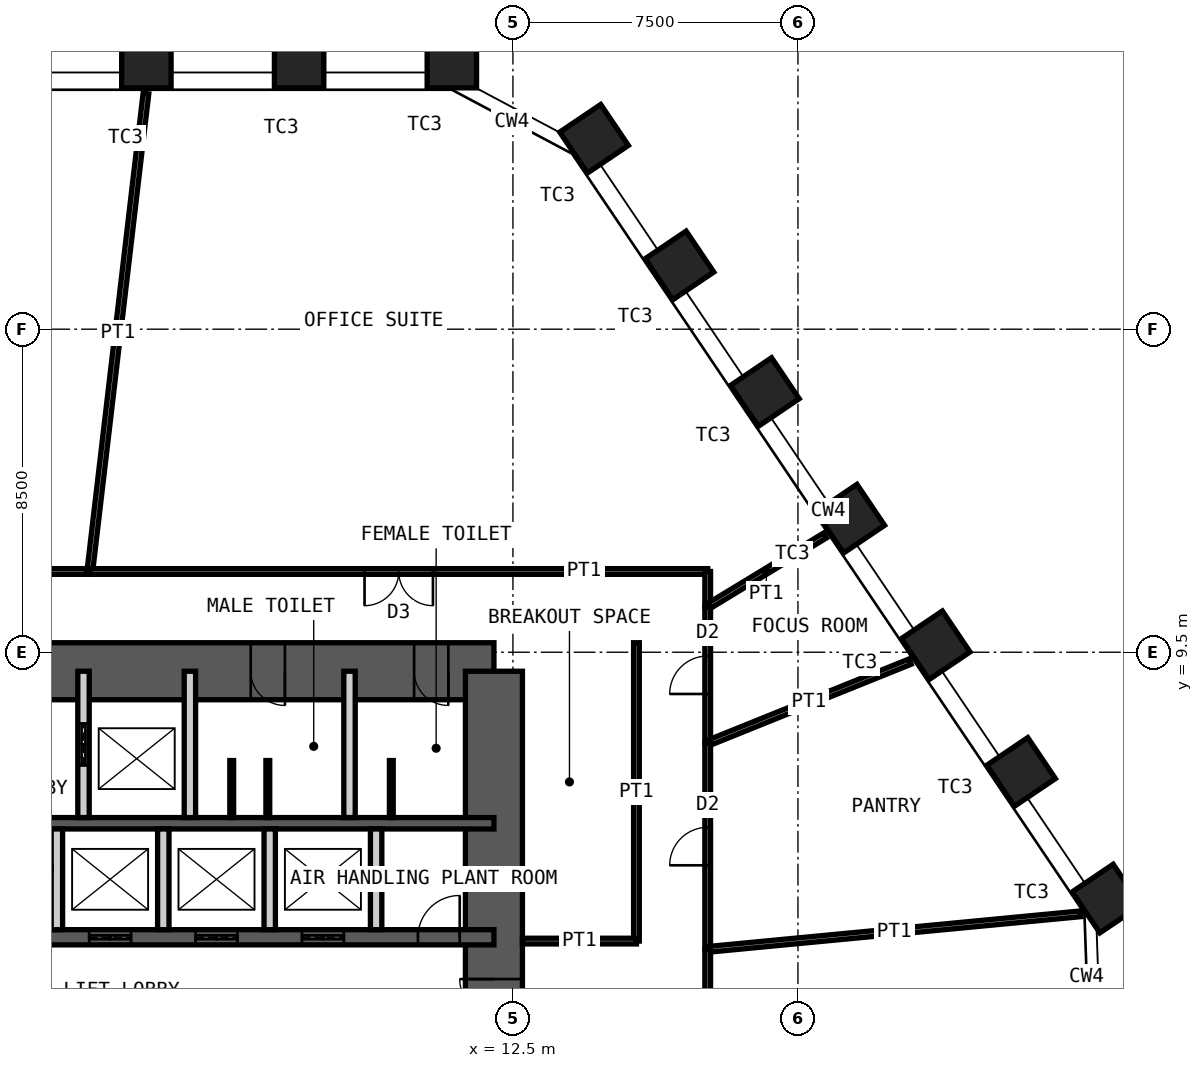
"""IFC4 building model, lengths in metres.
Left out: names, types, materials, properties, quantities, classifications, styles, units other than length and angle.
Written with IfcOpenShell. Run it as: python <this file> out.ifc"""

import sys

from ifc_helpers import new_model, si_unit, direction, frame, frame_2d, origin, origin_2d, place, context, subcontext, project, spatial, rectangle, hollow_rectangle, extrude, element, fill, save


model = new_model("IFC4")
c1 = context("Model", 3, precision=1e-05, world=origin(), true_north=direction((0.0, 1.0)))
c2 = subcontext(c1, "Body", "Model", "MODEL_VIEW")
j1 = project(units=[si_unit("LENGTHUNIT", "METRE"), si_unit("PLANEANGLEUNIT", "RADIAN")], contexts=[c1])
p1 = place(None, origin())
s1 = spatial("IfcSite", under=j1, at=p1, CompositionType="ELEMENT")
p2 = place(p1, origin())
s2 = spatial("IfcBuilding", under=s1, at=p2, CompositionType="ELEMENT")
p3 = place(p2, frame((0.0, 0.0, 124.0)))
s3 = spatial("IfcBuildingStorey", under=s2, at=p3, CompositionType="ELEMENT", Elevation=124.0)
for number, where, z_axis, x_axis in (
    (1, (2.854, 25.0, 0.0), (0.0, 0.0, 1.0), (-1.0, 0.0, 0.0)),
    (2, (6.874, 25.0, 0.0), (0.0, 0.0, 1.0), (-1.0, 0.0, 0.0)),
    (3, (10.893, 25.0, 0.0), (0.0, 0.0, 1.0), (-1.0, 0.0, 0.0)),
    (4, (14.635, 23.01, 0.0), (0.0, 0.0, 1.0), (-0.559, 0.829, 0.0)),
    (5, (16.882, 19.678, 0.0), (0.0, 0.0, 1.0), (-0.559, 0.829, 0.0)),
    (6, (19.13, 16.346, 0.0), (0.0, 0.0, 1.0), (-0.559, 0.829, 0.0)),
    (7, (21.377, 13.014, 0.0), (0.0, 0.0, 1.0), (-0.559, 0.829, 0.0)),
    (8, (23.625, 9.682, 0.0), (0.0, 0.0, 1.0), (-0.559, 0.829, 0.0)),
    (9, (25.872, 6.351, 0.0), (0.0, 0.0, 1.0), (-0.559, 0.829, 0.0)),
    (10, (28.119, 3.019, 0.0), (0.0, 0.0, 1.0), (-0.559, 0.829, 0.0)),
):
    element("IfcColumn", number, at=place(p3, frame(where, z_axis=z_axis, x_axis=x_axis)), inside=s3, PredefinedType="COLUMN", context=c2, shape_type="SweptSolid", body=[
        extrude(hollow_rectangle(XDim=1.3, YDim=1.3, WallThickness=0.1, at=origin_2d()), origin(), (0.0, 0.0, 1.0), 4.2),
    ])
p4 = place(p3, frame((-12.0, 9.0, 0.0), z_axis=(0.0, 0.0, 1.0), x_axis=(1.0, 0.0, 0.0)))
e11 = element("IfcWall", 11, at=p4, inside=s3, PredefinedType="SHEAR", context=c2, shape_type="SweptSolid", body=[
    extrude(rectangle(XDim=24.0, YDim=1.5, at=frame_2d((12.0, 0.0))), origin(), (0.0, 0.0, 1.0), 4.2),
])
p5 = place(p4, frame((10.4, 0.0, 0.0)))
e12 = element("IfcOpeningElement", 12, at=p5, cuts=e11, PredefinedType="OPENING", context=c2, shape_type="SweptSolid", body=[
    extrude(rectangle(XDim=1.0, YDim=2.1, at=frame_2d((0.5, 1.05))), frame((0.0, 0.76, 0.0), z_axis=(0.0, -1.0, 0.0), x_axis=(1.0, 0.0, 0.0)), (0.0, 0.0, 1.0), 1.52),
])
p6 = place(p4, frame((17.6, 0.0, 0.0)))
e13 = element("IfcOpeningElement", 13, at=p6, cuts=e11, PredefinedType="OPENING", context=c2, shape_type="SweptSolid", body=[
    extrude(rectangle(XDim=0.9, YDim=2.1, at=frame_2d((0.45, 1.05))), frame((0.0, 0.76, 0.0), z_axis=(0.0, -1.0, 0.0), x_axis=(1.0, 0.0, 0.0)), (0.0, 0.0, 1.0), 1.52),
])
p7 = place(p4, frame((21.9, 0.0, 0.0)))
e14 = element("IfcOpeningElement", 14, at=p7, cuts=e11, PredefinedType="OPENING", context=c2, shape_type="SweptSolid", body=[
    extrude(rectangle(XDim=0.9, YDim=2.1, at=frame_2d((0.45, 1.05))), frame((0.0, 0.76, 0.0), z_axis=(0.0, -1.0, 0.0), x_axis=(1.0, 0.0, 0.0)), (0.0, 0.0, 1.0), 1.52),
])
p8 = place(p3, frame((12.0, -9.0, 0.0), z_axis=(0.0, 0.0, 1.0), x_axis=(0.0, 1.0, 0.0)))
e15 = element("IfcWall", 15, at=p8, inside=s3, PredefinedType="SHEAR", context=c2, shape_type="SweptSolid", body=[
    extrude(rectangle(XDim=18.0, YDim=1.5, at=frame_2d((9.0, 0.0))), origin(), (0.0, 0.0, 1.0), 4.2),
])
p9 = place(p8, frame((8.1, 0.0, 0.0)))
e16 = element("IfcOpeningElement", 16, at=p9, cuts=e15, PredefinedType="OPENING", context=c2, shape_type="SweptSolid", body=[
    extrude(rectangle(XDim=1.8, YDim=2.1, at=frame_2d((0.9, 1.05))), frame((0.0, 0.76, 0.0), z_axis=(0.0, -1.0, 0.0), x_axis=(1.0, 0.0, 0.0)), (0.0, 0.0, 1.0), 1.52),
])
p10 = place(p3, frame((-12.0, 5.0, 0.0), z_axis=(0.0, 0.0, 1.0), x_axis=(1.0, 0.0, 0.0)))
e17 = element("IfcWall", 17, at=p10, inside=s3, PredefinedType="SHEAR", context=c2, shape_type="SweptSolid", body=[
    extrude(rectangle(XDim=24.0, YDim=0.3, at=frame_2d((12.0, 0.0))), origin(), (0.0, 0.0, 1.0), 4.2),
])
p11 = place(p3, frame((-12.0, 2.0, 0.0), z_axis=(0.0, 0.0, 1.0), x_axis=(1.0, 0.0, 0.0)))
e18 = element("IfcWall", 18, at=p11, inside=s3, PredefinedType="SHEAR", context=c2, shape_type="SweptSolid", body=[
    extrude(rectangle(XDim=24.0, YDim=0.4, at=frame_2d((12.0, 0.0))), origin(), (0.0, 0.0, 1.0), 4.2),
])
p12 = place(p11, frame((2.4, 0.0, 0.0)))
e19 = element("IfcOpeningElement", 19, at=p12, cuts=e18, PredefinedType="OPENING", context=c2, shape_type="SweptSolid", body=[
    extrude(rectangle(XDim=1.1, YDim=2.1, at=frame_2d((0.55, 1.05))), frame((0.0, 0.21, 0.0), z_axis=(0.0, -1.0, 0.0), x_axis=(1.0, 0.0, 0.0)), (0.0, 0.0, 1.0), 0.42),
])
p13 = place(p11, frame((22.0, 0.0, 0.0)))
e20 = element("IfcOpeningElement", 20, at=p13, cuts=e18, PredefinedType="OPENING", context=c2, shape_type="SweptSolid", body=[
    extrude(rectangle(XDim=1.1, YDim=2.1, at=frame_2d((0.55, 1.05))), frame((0.0, 0.21, 0.0), z_axis=(0.0, -1.0, 0.0), x_axis=(1.0, 0.0, 0.0)), (0.0, 0.0, 1.0), 0.42),
])
p14 = place(p11, frame((10.15, 0.0, 0.0)))
e21 = element("IfcOpeningElement", 21, at=p14, cuts=e18, PredefinedType="OPENING", context=c2, shape_type="SweptSolid", body=[
    extrude(rectangle(XDim=1.0, YDim=2.1, at=frame_2d((0.5, 1.05))), frame((0.0, 0.21, 0.0), z_axis=(0.0, -1.0, 0.0), x_axis=(1.0, 0.0, 0.0)), (0.0, 0.0, 1.0), 0.42),
])
p15 = place(p11, frame((6.9, 0.0, 0.0)))
e22 = element("IfcOpeningElement", 22, at=p15, cuts=e18, PredefinedType="OPENING", context=c2, shape_type="SweptSolid", body=[
    extrude(rectangle(XDim=1.0, YDim=2.1, at=frame_2d((0.5, 1.05))), frame((0.0, 0.21, 0.0), z_axis=(0.0, -1.0, 0.0), x_axis=(1.0, 0.0, 0.0)), (0.0, 0.0, 1.0), 0.42),
])
p16 = place(p11, frame((13.35, 0.0, 0.0)))
e23 = element("IfcOpeningElement", 23, at=p16, cuts=e18, PredefinedType="OPENING", context=c2, shape_type="SweptSolid", body=[
    extrude(rectangle(XDim=1.1, YDim=2.4, at=frame_2d((0.55, 1.2))), frame((0.0, 0.21, 0.0), z_axis=(0.0, -1.0, 0.0), x_axis=(1.0, 0.0, 0.0)), (0.0, 0.0, 1.0), 0.42),
])
p17 = place(p11, frame((16.15, 0.0, 0.0)))
e24 = element("IfcOpeningElement", 24, at=p17, cuts=e18, PredefinedType="OPENING", context=c2, shape_type="SweptSolid", body=[
    extrude(rectangle(XDim=1.1, YDim=2.4, at=frame_2d((0.55, 1.2))), frame((0.0, 0.21, 0.0), z_axis=(0.0, -1.0, 0.0), x_axis=(1.0, 0.0, 0.0)), (0.0, 0.0, 1.0), 0.42),
])
p18 = place(p11, frame((18.95, 0.0, 0.0)))
e25 = element("IfcOpeningElement", 25, at=p18, cuts=e18, PredefinedType="OPENING", context=c2, shape_type="SweptSolid", body=[
    extrude(rectangle(XDim=1.1, YDim=2.4, at=frame_2d((0.55, 1.2))), frame((0.0, 0.21, 0.0), z_axis=(0.0, -1.0, 0.0), x_axis=(1.0, 0.0, 0.0)), (0.0, 0.0, 1.0), 0.42),
])
p19 = place(p3, frame((1.2, 5.15, 0.0), z_axis=(0.0, 0.0, 1.0), x_axis=(0.0, 1.0, 0.0)))
e26 = element("IfcWall", 26, at=p19, inside=s3, PredefinedType="PARTITIONING", context=c2, shape_type="SweptSolid", body=[
    extrude(rectangle(XDim=3.85, YDim=0.3, at=frame_2d((1.925, 0.0))), origin(), (0.0, 0.0, 1.0), 3.98),
])
p20 = place(p19, frame((1.375, 0.0, 0.0)))
e27 = element("IfcOpeningElement", 27, at=p20, cuts=e26, PredefinedType="OPENING", context=c2, shape_type="SweptSolid", body=[
    extrude(rectangle(XDim=1.1, YDim=2.4, at=frame_2d((0.55, 1.2))), frame((0.0, 0.16, 0.0), z_axis=(0.0, -1.0, 0.0), x_axis=(1.0, 0.0, 0.0)), (0.0, 0.0, 1.0), 0.32),
])
for number, where, z_axis, x_axis in (
    (28, (4.0, 5.15, 0.0), (0.0, 0.0, 1.0), (0.0, 1.0, 0.0)),
    (29, (8.2, 5.15, 0.0), (0.0, 0.0, 1.0), (0.0, 1.0, 0.0)),
):
    element("IfcWall", number, at=place(p3, frame(where, z_axis=z_axis, x_axis=x_axis)), inside=s3, PredefinedType="PARTITIONING", context=c2, shape_type="SweptSolid", body=[
        extrude(rectangle(XDim=3.85, YDim=0.3, at=frame_2d((1.925, 0.0))), origin(), (0.0, 0.0, 1.0), 3.98),
    ])
for number, where, z_axis, x_axis in (
    (30, (0.5, 2.2, 0.0), (0.0, 0.0, 1.0), (0.0, 1.0, 0.0)),
    (31, (3.3, 2.2, 0.0), (0.0, 0.0, 1.0), (0.0, 1.0, 0.0)),
    (32, (6.1, 2.2, 0.0), (0.0, 0.0, 1.0), (0.0, 1.0, 0.0)),
    (33, (8.9, 2.2, 0.0), (0.0, 0.0, 1.0), (0.0, 1.0, 0.0)),
):
    element("IfcWall", number, at=place(p3, frame(where, z_axis=z_axis, x_axis=x_axis)), inside=s3, PredefinedType="PARTITIONING", context=c2, shape_type="SweptSolid", body=[
        extrude(rectangle(XDim=2.65, YDim=0.3, at=frame_2d((1.325, 0.0))), origin(), (0.0, 0.0, 1.0), 3.98),
    ])
for number, where, z_axis, x_axis in (
    (34, (5.1, 5.15, 0.0), (0.0, 0.0, 1.0), (0.0, 1.0, 0.0)),
    (35, (6.05, 5.15, 0.0), (0.0, 0.0, 1.0), (0.0, 1.0, 0.0)),
    (36, (9.3, 5.15, 0.0), (0.0, 0.0, 1.0), (0.0, 1.0, 0.0)),
):
    element("IfcWall", number, at=place(p3, frame(where, z_axis=z_axis, x_axis=x_axis)), inside=s3, PredefinedType="PARTITIONING", context=c2, shape_type="SweptSolid", body=[
        extrude(rectangle(XDim=1.5, YDim=0.1, at=frame_2d((0.75, 0.0))), origin(), (0.0, 0.0, 1.0), 2.1),
    ])
p21 = place(p3, frame((-8.277, 11.625, 0.0), z_axis=(0.0, 0.0, 1.0), x_axis=(1.0, 0.0, 0.0)))
e37 = element("IfcWall", 37, at=p21, inside=s3, PredefinedType="PARTITIONING", context=c2, shape_type="SweptSolid", body=[
    extrude(rectangle(XDim=9.642, YDim=0.15, at=frame_2d((4.821, 0.0))), origin(), (0.0, 0.0, 1.0), 4.03),
])
p22 = place(p21, frame((3.921, 0.0, 0.0)))
e38 = element("IfcOpeningElement", 38, at=p22, cuts=e37, PredefinedType="OPENING", context=c2, shape_type="SweptSolid", body=[
    extrude(rectangle(XDim=1.8, YDim=2.4, at=frame_2d((0.9, 1.2))), frame((0.0, 0.085, 0.0), z_axis=(0.0, -1.0, 0.0), x_axis=(1.0, 0.0, 0.0)), (0.0, 0.0, 1.0), 0.17),
])
p23 = place(p3, frame((2.843, 24.201, 0.0), z_axis=(0.0, 0.0, 1.0), x_axis=(-0.116670084723, -0.993170726175, 0.0)))
e39 = element("IfcWall", 39, at=p23, inside=s3, PredefinedType="PARTITIONING", context=c2, shape_type="SweptSolid", body=[
    extrude(rectangle(XDim=12.662, YDim=0.15, at=frame_2d((6.331, 0.0))), origin(), (0.0, 0.0, 1.0), 3.33),
])
p24 = place(p3, frame((1.366, 11.625, 0.0), z_axis=(0.0, 0.0, 1.0), x_axis=(1.0, 0.0, 0.0)))
e40 = element("IfcWall", 40, at=p24, inside=s3, PredefinedType="PARTITIONING", context=c2, shape_type="SweptSolid", body=[
    extrude(rectangle(XDim=16.259, YDim=0.15, at=frame_2d((8.13, 0.0))), origin(), (0.0, 0.0, 1.0), 4.03),
])
p25 = place(p24, frame((7.23, 0.0, 0.0)))
e41 = element("IfcOpeningElement", 41, at=p25, cuts=e40, PredefinedType="OPENING", context=c2, shape_type="SweptSolid", body=[
    extrude(rectangle(XDim=1.8, YDim=2.4, at=frame_2d((0.9, 1.2))), frame((0.0, 0.085, 0.0), z_axis=(0.0, -1.0, 0.0), x_axis=(1.0, 0.0, 0.0)), (0.0, 0.0, 1.0), 0.17),
])
p26 = place(p3, frame((17.625, 11.625, 0.0), z_axis=(0.0, 0.0, 1.0), x_axis=(0.0, -1.0, 0.0)))
e42 = element("IfcWall", 42, at=p26, inside=s3, PredefinedType="PARTITIONING", context=c2, shape_type="SweptSolid", body=[
    extrude(rectangle(XDim=0.927, YDim=0.15, at=frame_2d((0.464, 0.0))), origin(), (0.0, 0.0, 1.0), 4.03),
])
p27 = place(p3, frame((20.711, 12.571, 0.0), z_axis=(0.0, 0.0, 1.0), x_axis=(-0.854862500505, -0.518854608952, 0.0)))
e43 = element("IfcWall", 43, at=p27, inside=s3, PredefinedType="PARTITIONING", context=c2, shape_type="SweptSolid", body=[
    extrude(rectangle(XDim=3.61, YDim=0.15, at=frame_2d((1.805, 0.0))), origin(), (0.0, 0.0, 1.0), 3.33),
])
p28 = place(p3, frame((17.625, 10.698, 0.0), z_axis=(0.0, 0.0, 1.0), x_axis=(0.0, -1.0, 0.0)))
e44 = element("IfcWall", 44, at=p28, inside=s3, PredefinedType="PARTITIONING", context=c2, shape_type="SweptSolid", body=[
    extrude(rectangle(XDim=3.592, YDim=0.15, at=frame_2d((1.796, 0.0))), origin(), (0.0, 0.0, 1.0), 4.03),
])
p29 = place(p28, frame((1.296, 0.0, 0.0)))
e45 = element("IfcOpeningElement", 45, at=p29, cuts=e44, PredefinedType="OPENING", context=c2, shape_type="SweptSolid", body=[
    extrude(rectangle(XDim=1.0, YDim=2.4, at=frame_2d((0.5, 1.2))), frame((0.0, 0.085, 0.0), z_axis=(0.0, -1.0, 0.0), x_axis=(1.0, 0.0, 0.0)), (0.0, 0.0, 1.0), 0.17),
])
p30 = place(p3, frame((22.951, 9.254, 0.0), z_axis=(0.0, 0.0, 1.0), x_axis=(-0.927444087873, -0.373961848147, 0.0)))
e46 = element("IfcWall", 46, at=p30, inside=s3, PredefinedType="PARTITIONING", context=c2, shape_type="SweptSolid", body=[
    extrude(rectangle(XDim=5.743, YDim=0.15, at=frame_2d((2.872, 0.0))), origin(), (0.0, 0.0, 1.0), 3.33),
])
p31 = place(p3, frame((17.625, 7.106, 0.0), z_axis=(0.0, 0.0, 1.0), x_axis=(0.0, -1.0, 0.0)))
e47 = element("IfcWall", 47, at=p31, inside=s3, PredefinedType="PARTITIONING", context=c2, shape_type="SweptSolid", body=[
    extrude(rectangle(XDim=5.425, YDim=0.15, at=frame_2d((2.712, 0.0))), origin(), (0.0, 0.0, 1.0), 4.03),
])
p32 = place(p31, frame((2.212, 0.0, 0.0)))
e48 = element("IfcOpeningElement", 48, at=p32, cuts=e47, PredefinedType="OPENING", context=c2, shape_type="SweptSolid", body=[
    extrude(rectangle(XDim=1.0, YDim=2.4, at=frame_2d((0.5, 1.2))), frame((0.0, 0.085, 0.0), z_axis=(0.0, -1.0, 0.0), x_axis=(1.0, 0.0, 0.0)), (0.0, 0.0, 1.0), 0.17),
])
p33 = place(p3, frame((27.439, 2.618, 0.0), z_axis=(0.0, 0.0, 1.0), x_axis=(-0.995480435234, -0.094966852466, 0.0)))
e49 = element("IfcWall", 49, at=p33, inside=s3, PredefinedType="PARTITIONING", context=c2, shape_type="SweptSolid", body=[
    extrude(rectangle(XDim=9.859, YDim=0.15, at=frame_2d((4.93, 0.0))), origin(), (0.0, 0.0, 1.0), 2.93),
])
p34 = place(p3, frame((17.625, 1.681, 0.0), z_axis=(0.0, 0.0, 1.0), x_axis=(0.0, -1.0, 0.0)))
e50 = element("IfcWall", 50, at=p34, inside=s3, PredefinedType="PARTITIONING", context=c2, shape_type="SweptSolid", body=[
    extrude(rectangle(XDim=7.394, YDim=0.15, at=frame_2d((3.697, 0.0))), origin(), (0.0, 0.0, 1.0), 4.03),
])
p35 = place(p34, frame((3.197, 0.0, 0.0)))
e51 = element("IfcOpeningElement", 51, at=p35, cuts=e50, PredefinedType="OPENING", context=c2, shape_type="SweptSolid", body=[
    extrude(rectangle(XDim=1.0, YDim=2.4, at=frame_2d((0.5, 1.2))), frame((0.0, 0.085, 0.0), z_axis=(0.0, -1.0, 0.0), x_axis=(1.0, 0.0, 0.0)), (0.0, 0.0, 1.0), 0.17),
])
p36 = place(p3, frame((15.75, 1.9, 0.0), z_axis=(0.0, 0.0, 1.0), x_axis=(0.0, 1.0, 0.0)))
e52 = element("IfcWall", 52, at=p36, inside=s3, PredefinedType="PARTITIONING", context=c2, shape_type="SweptSolid", body=[
    extrude(rectangle(XDim=7.85, YDim=0.15, at=frame_2d((3.925, 0.0))), origin(), (0.0, 0.0, 1.0), 4.03),
])
p37 = place(p3, frame((12.75, 1.9, 0.0), z_axis=(0.0, 0.0, 1.0), x_axis=(1.0, 0.0, 0.0)))
e53 = element("IfcWall", 53, at=p37, inside=s3, PredefinedType="PARTITIONING", context=c2, shape_type="SweptSolid", body=[
    extrude(rectangle(XDim=3.0, YDim=0.15, at=frame_2d((1.5, 0.0))), origin(), (0.0, 0.0, 1.0), 2.93),
])
p38 = place(p6, origin())
e54 = element("IfcDoor", 54, at=p38, inside=s3, OperationType="SINGLE_SWING_RIGHT", PredefinedType="DOOR", context=c2, shape_type="SweptSolid", body=[
    extrude(rectangle(XDim=0.9, YDim=2.1, at=frame_2d((0.45, 1.05))), frame((0.0, 0.025, 0.0), z_axis=(0.0, -1.0, 0.0), x_axis=(1.0, 0.0, 0.0)), (0.0, 0.0, 1.0), 0.05),
])
fill(e13, e54)
p39 = place(p7, origin())
e55 = element("IfcDoor", 55, at=p39, inside=s3, OperationType="SINGLE_SWING_RIGHT", PredefinedType="DOOR", context=c2, shape_type="SweptSolid", body=[
    extrude(rectangle(XDim=0.9, YDim=2.1, at=frame_2d((0.45, 1.05))), frame((0.0, 0.025, 0.0), z_axis=(0.0, -1.0, 0.0), x_axis=(1.0, 0.0, 0.0)), (0.0, 0.0, 1.0), 0.05),
])
fill(e14, e55)
p40 = place(p13, origin())
e56 = element("IfcDoor", 56, at=p40, inside=s3, OperationType="SINGLE_SWING_LEFT", PredefinedType="DOOR", context=c2, shape_type="SweptSolid", body=[
    extrude(rectangle(XDim=1.1, YDim=2.1, at=frame_2d((0.55, 1.05))), frame((0.0, 0.025, 0.0), z_axis=(0.0, -1.0, 0.0), x_axis=(1.0, 0.0, 0.0)), (0.0, 0.0, 1.0), 0.05),
])
fill(e20, e56)
p41 = place(p9, origin())
e57 = element("IfcDoor", 57, at=p41, inside=s3, OperationType="DOUBLE_DOOR_DOUBLE_SWING", PredefinedType="DOOR", context=c2, shape_type="SweptSolid", body=[
    extrude(rectangle(XDim=1.8, YDim=2.1, at=frame_2d((0.9, 1.05))), frame((0.0, 0.025, 0.0), z_axis=(0.0, -1.0, 0.0), x_axis=(1.0, 0.0, 0.0)), (0.0, 0.0, 1.0), 0.05),
])
fill(e16, e57)
p42 = place(p20, origin())
e58 = element("IfcDoor", 58, at=p42, inside=s3, OperationType="DOUBLE_DOOR_SLIDING", PredefinedType="DOOR", context=c2, shape_type="SweptSolid", body=[
    extrude(rectangle(XDim=1.1, YDim=2.4, at=frame_2d((0.55, 1.2))), frame((0.0, 0.025, 0.0), z_axis=(0.0, -1.0, 0.0), x_axis=(1.0, 0.0, 0.0)), (0.0, 0.0, 1.0), 0.05),
])
fill(e27, e58)
p43 = place(p16, origin())
e59 = element("IfcDoor", 59, at=p43, inside=s3, OperationType="DOUBLE_DOOR_SLIDING", PredefinedType="DOOR", context=c2, shape_type="SweptSolid", body=[
    extrude(rectangle(XDim=1.1, YDim=2.4, at=frame_2d((0.55, 1.2))), frame((0.0, 0.025, 0.0), z_axis=(0.0, -1.0, 0.0), x_axis=(1.0, 0.0, 0.0)), (0.0, 0.0, 1.0), 0.05),
])
fill(e23, e59)
p44 = place(p17, origin())
e60 = element("IfcDoor", 60, at=p44, inside=s3, OperationType="DOUBLE_DOOR_SLIDING", PredefinedType="DOOR", context=c2, shape_type="SweptSolid", body=[
    extrude(rectangle(XDim=1.1, YDim=2.4, at=frame_2d((0.55, 1.2))), frame((0.0, 0.025, 0.0), z_axis=(0.0, -1.0, 0.0), x_axis=(1.0, 0.0, 0.0)), (0.0, 0.0, 1.0), 0.05),
])
fill(e24, e60)
p45 = place(p18, origin())
e61 = element("IfcDoor", 61, at=p45, inside=s3, OperationType="DOUBLE_DOOR_SLIDING", PredefinedType="DOOR", context=c2, shape_type="SweptSolid", body=[
    extrude(rectangle(XDim=1.1, YDim=2.4, at=frame_2d((0.55, 1.2))), frame((0.0, 0.025, 0.0), z_axis=(0.0, -1.0, 0.0), x_axis=(1.0, 0.0, 0.0)), (0.0, 0.0, 1.0), 0.05),
])
fill(e25, e61)
p46 = place(p25, origin())
e62 = element("IfcDoor", 62, at=p46, inside=s3, OperationType="DOUBLE_DOOR_DOUBLE_SWING", PredefinedType="DOOR", context=c2, shape_type="SweptSolid", body=[
    extrude(rectangle(XDim=1.8, YDim=2.4, at=frame_2d((0.9, 1.2))), frame((0.0, 0.025, 0.0), z_axis=(0.0, -1.0, 0.0), x_axis=(1.0, 0.0, 0.0)), (0.0, 0.0, 1.0), 0.05),
])
fill(e41, e62)
p47 = place(p29, origin())
e63 = element("IfcDoor", 63, at=p47, inside=s3, OperationType="SINGLE_SWING_RIGHT", PredefinedType="DOOR", context=c2, shape_type="SweptSolid", body=[
    extrude(rectangle(XDim=1.0, YDim=2.4, at=frame_2d((0.5, 1.2))), frame((0.0, 0.025, 0.0), z_axis=(0.0, -1.0, 0.0), x_axis=(1.0, 0.0, 0.0)), (0.0, 0.0, 1.0), 0.05),
])
fill(e45, e63)
p48 = place(p32, origin())
e64 = element("IfcDoor", 64, at=p48, inside=s3, OperationType="SINGLE_SWING_RIGHT", PredefinedType="DOOR", context=c2, shape_type="SweptSolid", body=[
    extrude(rectangle(XDim=1.0, YDim=2.4, at=frame_2d((0.5, 1.2))), frame((0.0, 0.025, 0.0), z_axis=(0.0, -1.0, 0.0), x_axis=(1.0, 0.0, 0.0)), (0.0, 0.0, 1.0), 0.05),
])
fill(e48, e64)
save(model, sys.argv[1])
